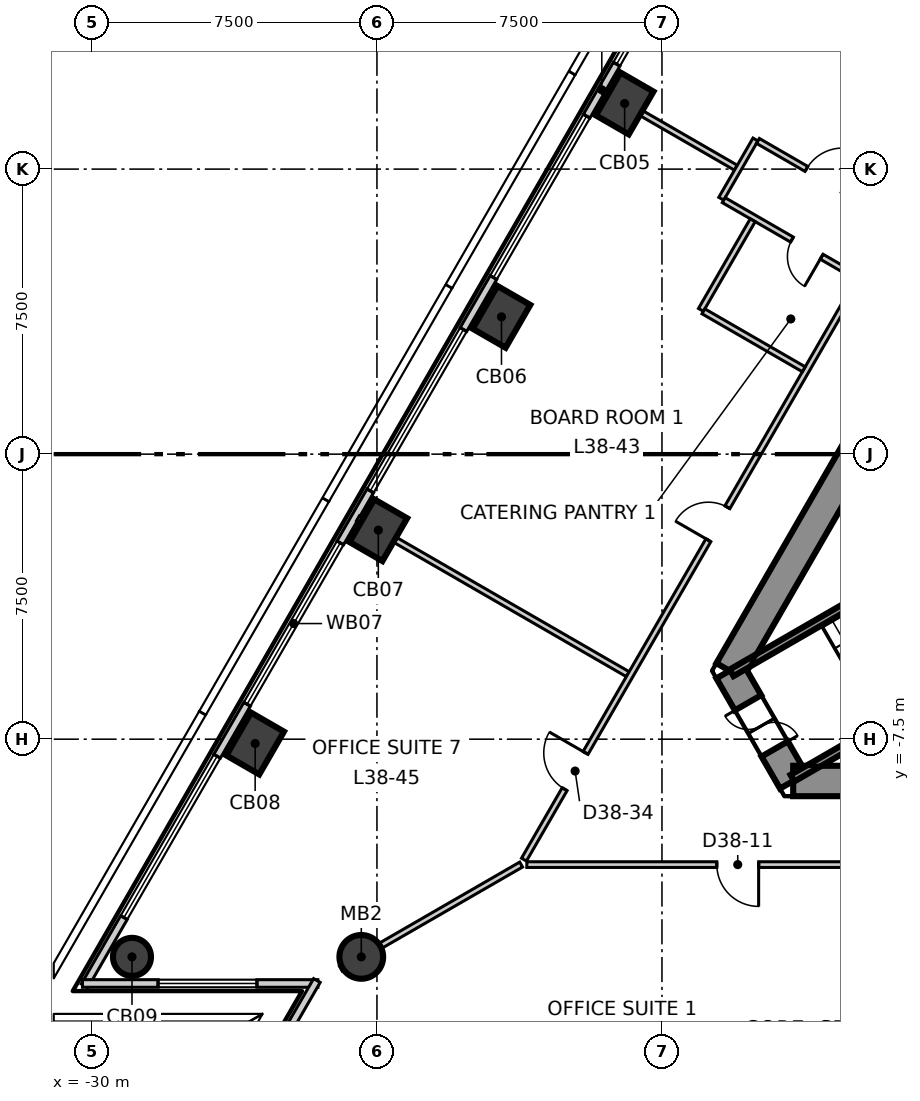
"""IFC4 building model, lengths in metres.
Left out: names, types, materials, properties, quantities, classifications, styles, units other than length and angle.
Written with IfcOpenShell. Run it as: python <this file> out.ifc"""

import sys

from ifc_helpers import new_model, si_unit, direction, frame, frame_2d, origin, origin_2d, place, context, subcontext, project, spatial, polyline, rectangle, circle, outline, extrude, element, fill, save


model = new_model("IFC4")
c1 = context("Model", 3, precision=1e-05, world=origin(), true_north=direction((0.0, 1.0)))
c2 = subcontext(c1, "Body", "Model", "MODEL_VIEW")
j1 = project(units=[si_unit("LENGTHUNIT", "METRE"), si_unit("PLANEANGLEUNIT", "RADIAN")], contexts=[c1])
p1 = place(None, origin())
s1 = spatial("IfcSite", under=j1, at=p1, CompositionType="ELEMENT")
p2 = place(p1, origin())
s2 = spatial("IfcBuilding", under=s1, at=p2, CompositionType="ELEMENT")
p3 = place(p2, frame((0.0, 0.0, 164.3)))
s3 = spatial("IfcBuildingStorey", under=s2, at=p3, CompositionType="ELEMENT", Elevation=164.3)
p4 = place(p3, frame((-1.674, 14.3, -0.3), z_axis=(0.0, 0.0, 1.0), x_axis=(-0.499995765644, -0.866027848477, 0.0)))
e1 = element("IfcWall", 1, at=p4, inside=s3, PredefinedType="SHEAR", context=c2, shape_type="SweptSolid", body=[
    extrude(outline(polyline([(-0.231, -0.4), (1.732, -0.4), (3.695, -0.4), (5.658, -0.4), (7.621, -0.4), (9.584, -0.4), (11.547, -0.4), (13.51, -0.4), (15.473, -0.4), (17.436, -0.4), (19.399, -0.4), (21.362, -0.4), (23.325, -0.4), (22.863, 0.4), (20.977, 0.4), (19.091, 0.4), (17.205, 0.4), (15.319, 0.4), (13.433, 0.4), (11.547, 0.4), (9.661, 0.4), (7.775, 0.4), (5.889, 0.4), (4.003, 0.4), (2.117, 0.4), (0.231, 0.4), (-0.231, -0.4)])), origin(), (0.0, 0.0, 1.0), 4.0),
])
p5 = place(p4, frame((10.997, 0.0, 0.3)))
e2 = element("IfcOpeningElement", 2, at=p5, cuts=e1, PredefinedType="OPENING", context=c2, shape_type="SweptSolid", body=[
    extrude(rectangle(XDim=1.1, YDim=2.1, at=frame_2d((0.55, 1.05))), frame((0.0, 0.41, 0.0), z_axis=(0.0, -1.0, 0.0), x_axis=(1.0, 0.0, 0.0)), (0.0, 0.0, 1.0), 0.82),
])
p6 = place(p3, frame((-13.221, -5.7, -0.3), z_axis=(0.0, 0.0, 1.0), x_axis=(0.49987182685, -0.866099391942, 0.0)))
e3 = element("IfcWall", 3, at=p6, inside=s3, PredefinedType="SHEAR", context=c2, shape_type="SweptSolid", body=[
    extrude(outline(polyline([(-0.231, -0.4), (1.674, -0.4), (3.579, -0.4), (3.118, 0.4), (1.674, 0.4), (0.231, 0.4), (-0.231, -0.4)])), origin(), (0.0, 0.0, 1.0), 4.0),
])
p7 = place(p6, frame((0.974, 0.0, 0.3)))
e4 = element("IfcOpeningElement", 4, at=p7, cuts=e3, PredefinedType="OPENING", context=c2, shape_type="SweptSolid", body=[
    extrude(rectangle(XDim=1.4, YDim=2.1, at=frame_2d((0.7, 1.05))), frame((0.0, 0.41, 0.0), z_axis=(0.0, -1.0, 0.0), x_axis=(1.0, 0.0, 0.0)), (0.0, 0.0, 1.0), 0.82),
])
p8 = place(p3, frame((-11.547, -8.6, -0.3), z_axis=(0.0, 0.0, 1.0), x_axis=(1.0, 0.0, 0.0)))
e5 = element("IfcWall", 5, at=p8, inside=s3, PredefinedType="SHEAR", context=c2, shape_type="SweptSolid", body=[
    extrude(outline(polyline([(-0.231, -0.4), (1.732, -0.4), (3.695, -0.4), (5.658, -0.4), (7.621, -0.4), (9.584, -0.4), (11.547, -0.4), (13.51, -0.4), (15.473, -0.4), (17.436, -0.4), (19.399, -0.4), (21.362, -0.4), (23.325, -0.4), (22.863, 0.4), (20.977, 0.4), (19.091, 0.4), (17.205, 0.4), (15.319, 0.4), (13.433, 0.4), (11.547, 0.4), (9.661, 0.4), (7.775, 0.4), (5.889, 0.4), (4.003, 0.4), (2.117, 0.4), (0.231, 0.4), (-0.231, -0.4)])), origin(), (0.0, 0.0, 1.0), 4.0),
])
p9 = place(p8, frame((3.34, 0.0, 0.3)))
e6 = element("IfcOpeningElement", 6, at=p9, cuts=e5, PredefinedType="OPENING", context=c2, shape_type="SweptSolid", body=[
    extrude(rectangle(XDim=0.9, YDim=2.1, at=frame_2d((0.45, 1.05))), frame((0.0, 0.41, 0.0), z_axis=(0.0, -1.0, 0.0), x_axis=(1.0, 0.0, 0.0)), (0.0, 0.0, 1.0), 0.82),
])
p10 = place(p8, frame((17.722, 0.0, 0.3)))
e7 = element("IfcOpeningElement", 7, at=p10, cuts=e5, PredefinedType="OPENING", context=c2, shape_type="SweptSolid", body=[
    extrude(rectangle(XDim=0.9, YDim=2.1, at=frame_2d((0.45, 1.05))), frame((0.0, 0.41, 0.0), z_axis=(0.0, -1.0, 0.0), x_axis=(1.0, 0.0, 0.0)), (0.0, 0.0, 1.0), 0.82),
])
for number, where, z_axis, x_axis in (
    (8, (-15.982, 9.227, -0.3), (0.0, 0.0, 1.0), (0.5, 0.866, 0.0)),
    (9, (-19.223, 3.613, -0.3), (0.0, 0.0, 1.0), (0.5, 0.866, 0.0)),
    (10, (-22.464, -2.0, -0.3), (0.0, 0.0, 1.0), (0.5, 0.866, 0.0)),
    (11, (-25.705, -7.614, -0.3), (0.0, 0.0, 1.0), (0.5, 0.866, 0.0)),
):
    element("IfcColumn", number, at=place(p3, frame(where, z_axis=z_axis, x_axis=x_axis)), inside=s3, PredefinedType="COLUMN", context=c2, shape_type="SweptSolid", body=[
        extrude(rectangle(XDim=1.3, YDim=1.0, at=origin_2d()), origin(), (0.0, 0.0, 1.0), 4.0),
    ])
p11 = place(p3, frame((-28.946, -13.228, -0.3), z_axis=(0.0, 0.0, 1.0), x_axis=(0.5, 0.866025403784, 0.0)))
e12 = element("IfcColumn", 12, at=p11, inside=s3, PredefinedType="COLUMN", context=c2, shape_type="SweptSolid", body=[
    extrude(circle(Radius=0.5, at=origin_2d()), origin(), (0.0, 0.0, 1.0), 4.0),
])
p12 = place(p3, frame((-22.912, -13.228, -0.3), z_axis=(0.0, 0.0, 1.0), x_axis=(1.0, 0.0, 0.0)))
e13 = element("IfcColumn", 13, at=p12, inside=s3, PredefinedType="COLUMN", context=c2, shape_type="SweptSolid", body=[
    extrude(circle(Radius=0.575, at=origin_2d()), origin(), (0.0, 0.0, 1.0), 4.0),
])
p13 = place(p3, frame((-2.972, 33.16, 0.0), z_axis=(0.0, 0.0, 1.0), x_axis=(-0.500009959561, -0.866019653553, 0.0)))
e14 = element("IfcWall", 14, at=p13, inside=s3, PredefinedType="ELEMENTEDWALL", context=c2, shape_type="SweptSolid", body=[
    extrude(rectangle(XDim=54.443, YDim=0.2, at=frame_2d((27.222, 0.0))), origin(), (0.0, 0.0, 1.0), 3.7),
])
p14 = place(p13, frame((2.094, 0.0, 0.9)))
e15 = element("IfcOpeningElement", 15, at=p14, cuts=e14, PredefinedType="OPENING", context=c2, shape_type="SweptSolid", body=[
    extrude(rectangle(XDim=4.9, YDim=2.5, at=frame_2d((2.45, 1.25))), frame((0.0, 0.11, 0.0), z_axis=(0.0, -1.0, 0.0), x_axis=(1.0, 0.0, 0.0)), (0.0, 0.0, 1.0), 0.22),
])
p15 = place(p13, frame((8.576, 0.0, 0.9)))
e16 = element("IfcOpeningElement", 16, at=p15, cuts=e14, PredefinedType="OPENING", context=c2, shape_type="SweptSolid", body=[
    extrude(rectangle(XDim=4.9, YDim=2.5, at=frame_2d((2.45, 1.25))), frame((0.0, 0.11, 0.0), z_axis=(0.0, -1.0, 0.0), x_axis=(1.0, 0.0, 0.0)), (0.0, 0.0, 1.0), 0.22),
])
p16 = place(p13, frame((15.058, 0.0, 0.9)))
e17 = element("IfcOpeningElement", 17, at=p16, cuts=e14, PredefinedType="OPENING", context=c2, shape_type="SweptSolid", body=[
    extrude(rectangle(XDim=4.9, YDim=2.5, at=frame_2d((2.45, 1.25))), frame((0.0, 0.11, 0.0), z_axis=(0.0, -1.0, 0.0), x_axis=(1.0, 0.0, 0.0)), (0.0, 0.0, 1.0), 0.22),
])
p17 = place(p13, frame((21.54, 0.0, 0.9)))
e18 = element("IfcOpeningElement", 18, at=p17, cuts=e14, PredefinedType="OPENING", context=c2, shape_type="SweptSolid", body=[
    extrude(rectangle(XDim=4.9, YDim=2.5, at=frame_2d((2.45, 1.25))), frame((0.0, 0.11, 0.0), z_axis=(0.0, -1.0, 0.0), x_axis=(1.0, 0.0, 0.0)), (0.0, 0.0, 1.0), 0.22),
])
p18 = place(p13, frame((28.022, 0.0, 0.9)))
e19 = element("IfcOpeningElement", 19, at=p18, cuts=e14, PredefinedType="OPENING", context=c2, shape_type="SweptSolid", body=[
    extrude(rectangle(XDim=4.9, YDim=2.5, at=frame_2d((2.45, 1.25))), frame((0.0, 0.11, 0.0), z_axis=(0.0, -1.0, 0.0), x_axis=(1.0, 0.0, 0.0)), (0.0, 0.0, 1.0), 0.22),
])
p19 = place(p13, frame((34.505, 0.0, 0.9)))
e20 = element("IfcOpeningElement", 20, at=p19, cuts=e14, PredefinedType="OPENING", context=c2, shape_type="SweptSolid", body=[
    extrude(rectangle(XDim=4.9, YDim=2.5, at=frame_2d((2.45, 1.25))), frame((0.0, 0.11, 0.0), z_axis=(0.0, -1.0, 0.0), x_axis=(1.0, 0.0, 0.0)), (0.0, 0.0, 1.0), 0.22),
])
p20 = place(p13, frame((40.987, 0.0, 0.9)))
e21 = element("IfcOpeningElement", 21, at=p20, cuts=e14, PredefinedType="OPENING", context=c2, shape_type="SweptSolid", body=[
    extrude(rectangle(XDim=4.9, YDim=2.5, at=frame_2d((2.45, 1.25))), frame((0.0, 0.11, 0.0), z_axis=(0.0, -1.0, 0.0), x_axis=(1.0, 0.0, 0.0)), (0.0, 0.0, 1.0), 0.22),
])
p21 = place(p13, frame((47.469, 0.0, 0.9)))
e22 = element("IfcOpeningElement", 22, at=p21, cuts=e14, PredefinedType="OPENING", context=c2, shape_type="SweptSolid", body=[
    extrude(rectangle(XDim=4.9, YDim=2.5, at=frame_2d((2.45, 1.25))), frame((0.0, 0.11, 0.0), z_axis=(0.0, -1.0, 0.0), x_axis=(1.0, 0.0, 0.0)), (0.0, 0.0, 1.0), 0.22),
])
p22 = place(p3, frame((-30.249, -13.928, 0.0), z_axis=(0.0, 0.0, 1.0), x_axis=(1.0, 0.0, 0.0)))
e23 = element("IfcWall", 23, at=p22, inside=s3, PredefinedType="ELEMENTEDWALL", context=c2, shape_type="SweptSolid", body=[
    extrude(rectangle(XDim=6.194, YDim=0.2, at=frame_2d((3.097, 0.0))), origin(), (0.0, 0.0, 1.0), 3.7),
])
p23 = place(p22, frame((1.99, 0.0, 0.9)))
e24 = element("IfcOpeningElement", 24, at=p23, cuts=e23, PredefinedType="OPENING", context=c2, shape_type="SweptSolid", body=[
    extrude(rectangle(XDim=2.6, YDim=2.5, at=frame_2d((1.3, 1.25))), frame((0.0, 0.11, 0.0), z_axis=(0.0, -1.0, 0.0), x_axis=(1.0, 0.0, 0.0)), (0.0, 0.0, 1.0), 0.22),
])
p24 = place(p3, frame((-24.08, -13.85, 0.0), z_axis=(0.0, 0.0, 1.0), x_axis=(-0.499932836684, -0.86606417707, 0.0)))
e25 = element("IfcWall", 25, at=p24, inside=s3, PredefinedType="ELEMENTEDWALL", context=c2, shape_type="SweptSolid", body=[
    extrude(rectangle(XDim=6.195, YDim=0.2, at=frame_2d((3.097, 0.0))), origin(), (0.0, 0.0, 1.0), 3.7),
])
p25 = place(p24, frame((1.39, 0.0, 0.9)))
e26 = element("IfcOpeningElement", 26, at=p25, cuts=e25, PredefinedType="OPENING", context=c2, shape_type="SweptSolid", body=[
    extrude(rectangle(XDim=2.6, YDim=2.5, at=frame_2d((1.3, 1.25))), frame((0.0, 0.11, 0.0), z_axis=(0.0, -1.0, 0.0), x_axis=(1.0, 0.0, 0.0)), (0.0, 0.0, 1.0), 0.22),
])
p26 = place(p3, frame((-23.449, -13.538, 0.0), z_axis=(0.0, 0.0, 1.0), x_axis=(0.865971038555, 0.500094151519, 0.0)))
e27 = element("IfcWall", 27, at=p26, inside=s3, PredefinedType="PARTITIONING", context=c2, shape_type="SweptSolid", body=[
    extrude(rectangle(XDim=5.477, YDim=0.15, at=frame_2d((2.739, 0.0))), origin(), (0.0, 0.0, 1.0), 3.2),
])
p27 = place(p3, frame((-23.001, -1.69, 0.0), z_axis=(0.0, 0.0, 1.0), x_axis=(0.866010060309, -0.500026574738, 0.0)))
e28 = element("IfcWall", 28, at=p27, inside=s3, PredefinedType="PARTITIONING", context=c2, shape_type="SweptSolid", body=[
    extrude(rectangle(XDim=8.2, YDim=0.15, at=frame_2d((4.1, 0.0))), origin(), (0.0, 0.0, 1.0), 3.7),
])
p28 = place(p3, frame((-18.556, -10.8, 0.0), z_axis=(0.0, 0.0, 1.0), x_axis=(1.0, 0.0, 0.0)))
e29 = element("IfcWall", 29, at=p28, inside=s3, PredefinedType="PARTITIONING", context=c2, shape_type="SweptSolid", body=[
    extrude(rectangle(XDim=11.098, YDim=0.15, at=frame_2d((5.549, 0.0))), origin(), (0.0, 0.0, 1.0), 3.7),
])
p29 = place(p28, frame((5.0, 0.0, 0.0)))
e30 = element("IfcOpeningElement", 30, at=p29, cuts=e29, PredefinedType="OPENING", context=c2, shape_type="SweptSolid", body=[
    extrude(rectangle(XDim=1.1, YDim=2.1, at=frame_2d((0.55, 1.05))), frame((0.0, 0.085, 0.0), z_axis=(0.0, -1.0, 0.0), x_axis=(1.0, 0.0, 0.0)), (0.0, 0.0, 1.0), 0.17),
])
p30 = place(p3, frame((-18.631, -10.669, 0.0), z_axis=(0.0, 0.0, 1.0), x_axis=(0.500000173646, 0.86602530353, 0.0)))
e31 = element("IfcWall", 31, at=p30, inside=s3, PredefinedType="PARTITIONING", context=c2, shape_type="SweptSolid", body=[
    extrude(rectangle(XDim=17.654, YDim=0.15, at=frame_2d((8.827, 0.0))), origin(), (0.0, 0.0, 1.0), 3.7),
])
p31 = place(p30, frame((9.705, 0.0, 0.0)))
e32 = element("IfcOpeningElement", 32, at=p31, cuts=e31, PredefinedType="OPENING", context=c2, shape_type="SweptSolid", body=[
    extrude(rectangle(XDim=1.0, YDim=2.1, at=frame_2d((0.5, 1.05))), frame((0.0, 0.085, 0.0), z_axis=(0.0, -1.0, 0.0), x_axis=(1.0, 0.0, 0.0)), (0.0, 0.0, 1.0), 0.17),
])
p32 = place(p30, frame((2.141, 0.0, 0.0)))
e33 = element("IfcOpeningElement", 33, at=p32, cuts=e31, PredefinedType="OPENING", context=c2, shape_type="SweptSolid", body=[
    extrude(rectangle(XDim=1.1, YDim=2.1, at=frame_2d((0.55, 1.05))), frame((0.0, 0.085, 0.0), z_axis=(0.0, -1.0, 0.0), x_axis=(1.0, 0.0, 0.0)), (0.0, 0.0, 1.0), 0.17),
])
p33 = place(p3, frame((-16.519, 9.537, 0.0), z_axis=(0.0, 0.0, 1.0), x_axis=(0.866026010844, -0.49999894854, 0.0)))
e34 = element("IfcWall", 34, at=p33, inside=s3, PredefinedType="PARTITIONING", context=c2, shape_type="SweptSolid", body=[
    extrude(rectangle(XDim=4.0, YDim=0.15, at=frame_2d((2.0, 0.0))), origin(), (0.0, 0.0, 1.0), 3.2),
])
p34 = place(p3, frame((-13.44, 6.72, 0.0), z_axis=(0.0, 0.0, 1.0), x_axis=(0.499902469156, 0.866081705922, 0.0)))
e35 = element("IfcWall", 35, at=p34, inside=s3, PredefinedType="PARTITIONING", context=c2, shape_type="SweptSolid", body=[
    extrude(rectangle(XDim=1.8, YDim=0.15, at=frame_2d((0.9, 0.0))), origin(), (0.0, 0.0, 1.0), 3.7),
])
p35 = place(p3, frame((-12.475, 8.242, 0.0), z_axis=(0.0, 0.0, 1.0), x_axis=(0.865955608197, -0.500120870022, 0.0)))
e36 = element("IfcWall", 36, at=p35, inside=s3, PredefinedType="PARTITIONING", context=c2, shape_type="SweptSolid", body=[
    extrude(rectangle(XDim=4.049, YDim=0.15, at=frame_2d((2.024, 0.0))), origin(), (0.0, 0.0, 1.0), 3.7),
])
p36 = place(p35, frame((1.475, 0.0, 0.0)))
e37 = element("IfcOpeningElement", 37, at=p36, cuts=e36, PredefinedType="OPENING", context=c2, shape_type="SweptSolid", body=[
    extrude(rectangle(XDim=1.1, YDim=2.1, at=frame_2d((0.55, 1.05))), frame((0.0, 0.085, 0.0), z_axis=(0.0, -1.0, 0.0), x_axis=(1.0, 0.0, 0.0)), (0.0, 0.0, 1.0), 0.17),
])
p37 = place(p3, frame((-13.375, 6.683, 0.0), z_axis=(0.0, 0.0, 1.0), x_axis=(0.865929493314, -0.500166085025, 0.0)))
e38 = element("IfcWall", 38, at=p37, inside=s3, PredefinedType="PARTITIONING", context=c2, shape_type="SweptSolid", body=[
    extrude(rectangle(XDim=4.049, YDim=0.15, at=frame_2d((2.024, 0.0))), origin(), (0.0, 0.0, 1.0), 3.7),
])
p38 = place(p37, frame((2.075, 0.0, 0.0)))
e39 = element("IfcOpeningElement", 39, at=p38, cuts=e38, PredefinedType="OPENING", context=c2, shape_type="SweptSolid", body=[
    extrude(rectangle(XDim=0.9, YDim=2.1, at=frame_2d((0.45, 1.05))), frame((0.0, 0.085, 0.0), z_axis=(0.0, -1.0, 0.0), x_axis=(1.0, 0.0, 0.0)), (0.0, 0.0, 1.0), 0.17),
])
p39 = place(p3, frame((-13.974, 3.796, 0.0), z_axis=(0.0, 0.0, 1.0), x_axis=(0.500004325324, 0.866022906543, 0.0)))
e40 = element("IfcWall", 40, at=p39, inside=s3, PredefinedType="PARTITIONING", context=c2, shape_type="SweptSolid", body=[
    extrude(rectangle(XDim=2.724, YDim=0.15, at=frame_2d((1.362, 0.0))), origin(), (0.0, 0.0, 1.0), 3.7),
])
p40 = place(p3, frame((-13.909, 3.758, 0.0), z_axis=(0.0, 0.0, 1.0), x_axis=(0.865962925632, -0.500108199725, 0.0)))
e41 = element("IfcWall", 41, at=p40, inside=s3, PredefinedType="PARTITIONING", context=c2, shape_type="SweptSolid", body=[
    extrude(rectangle(XDim=3.05, YDim=0.15, at=frame_2d((1.525, 0.0))), origin(), (0.0, 0.0, 1.0), 3.7),
])
p41 = place(p3, frame((-10.324, 10.769, 0.0), z_axis=(0.0, 0.0, 1.0), x_axis=(0.866031223622, -0.49998991961, 0.0)))
e42 = element("IfcWall", 42, at=p41, inside=s3, PredefinedType="PARTITIONING", context=c2, shape_type="SweptSolid", body=[
    extrude(rectangle(XDim=3.45, YDim=0.15, at=frame_2d((1.725, 0.0))), origin(), (0.0, 0.0, 1.0), 3.7),
])
p42 = place(p3, frame((-13.167, -5.754, 0.0), z_axis=(0.0, 0.0, 1.0), x_axis=(0.866060938598, 0.499938446846, 0.0)))
e43 = element("IfcWall", 43, at=p42, inside=s3, PredefinedType="SOLIDWALL", context=c2, shape_type="SweptSolid", body=[
    extrude(rectangle(XDim=7.665, YDim=0.2, at=frame_2d((3.832, 0.0))), origin(), (0.0, 0.0, 1.0), 3.7),
])
p43 = place(p3, frame((-11.567, -8.526, 0.0), z_axis=(0.0, 0.0, 1.0), x_axis=(0.866005769735, 0.50003400563, 0.0)))
e44 = element("IfcWall", 44, at=p43, inside=s3, PredefinedType="SOLIDWALL", context=c2, shape_type="SweptSolid", body=[
    extrude(rectangle(XDim=7.665, YDim=0.2, at=frame_2d((3.833, 0.0))), origin(), (0.0, 0.0, 1.0), 3.7),
])
p44 = place(p17, origin())
e45 = element("IfcWindow", 45, at=p44, inside=s3, PartitioningType="SINGLE_PANEL", PredefinedType="WINDOW", context=c2, shape_type="SweptSolid", body=[
    extrude(rectangle(XDim=4.9, YDim=2.5, at=frame_2d((2.45, 1.25))), frame((0.0, 0.03, 0.0), z_axis=(0.0, -1.0, 0.0), x_axis=(1.0, 0.0, 0.0)), (0.0, 0.0, 1.0), 0.06),
])
fill(e18, e45)
p45 = place(p18, origin())
e46 = element("IfcWindow", 46, at=p45, inside=s3, PartitioningType="SINGLE_PANEL", PredefinedType="WINDOW", context=c2, shape_type="SweptSolid", body=[
    extrude(rectangle(XDim=4.9, YDim=2.5, at=frame_2d((2.45, 1.25))), frame((0.0, 0.03, 0.0), z_axis=(0.0, -1.0, 0.0), x_axis=(1.0, 0.0, 0.0)), (0.0, 0.0, 1.0), 0.06),
])
fill(e19, e46)
p46 = place(p19, origin())
e47 = element("IfcWindow", 47, at=p46, inside=s3, PartitioningType="SINGLE_PANEL", PredefinedType="WINDOW", context=c2, shape_type="SweptSolid", body=[
    extrude(rectangle(XDim=4.9, YDim=2.5, at=frame_2d((2.45, 1.25))), frame((0.0, 0.03, 0.0), z_axis=(0.0, -1.0, 0.0), x_axis=(1.0, 0.0, 0.0)), (0.0, 0.0, 1.0), 0.06),
])
fill(e20, e47)
p47 = place(p20, origin())
e48 = element("IfcWindow", 48, at=p47, inside=s3, PartitioningType="SINGLE_PANEL", PredefinedType="WINDOW", context=c2, shape_type="SweptSolid", body=[
    extrude(rectangle(XDim=4.9, YDim=2.5, at=frame_2d((2.45, 1.25))), frame((0.0, 0.03, 0.0), z_axis=(0.0, -1.0, 0.0), x_axis=(1.0, 0.0, 0.0)), (0.0, 0.0, 1.0), 0.06),
])
fill(e21, e48)
p48 = place(p21, origin())
e49 = element("IfcWindow", 49, at=p48, inside=s3, PartitioningType="SINGLE_PANEL", PredefinedType="WINDOW", context=c2, shape_type="SweptSolid", body=[
    extrude(rectangle(XDim=4.9, YDim=2.5, at=frame_2d((2.45, 1.25))), frame((0.0, 0.03, 0.0), z_axis=(0.0, -1.0, 0.0), x_axis=(1.0, 0.0, 0.0)), (0.0, 0.0, 1.0), 0.06),
])
fill(e22, e49)
p49 = place(p23, origin())
e50 = element("IfcWindow", 50, at=p49, inside=s3, PartitioningType="SINGLE_PANEL", PredefinedType="WINDOW", context=c2, shape_type="SweptSolid", body=[
    extrude(rectangle(XDim=2.6, YDim=2.5, at=frame_2d((1.3, 1.25))), frame((0.0, 0.03, 0.0), z_axis=(0.0, -1.0, 0.0), x_axis=(1.0, 0.0, 0.0)), (0.0, 0.0, 1.0), 0.06),
])
fill(e24, e50)
p50 = place(p29, origin())
e51 = element("IfcDoor", 51, at=p50, inside=s3, OperationType="SINGLE_SWING_RIGHT", PredefinedType="DOOR", context=c2, shape_type="SweptSolid", body=[
    extrude(rectangle(XDim=1.1, YDim=2.1, at=frame_2d((0.55, 1.05))), frame((0.0, 0.025, 0.0), z_axis=(0.0, -1.0, 0.0), x_axis=(1.0, 0.0, 0.0)), (0.0, 0.0, 1.0), 0.05),
])
fill(e30, e51)
p51 = place(p36, origin())
e52 = element("IfcDoor", 52, at=p51, inside=s3, OperationType="SINGLE_SWING_LEFT", PredefinedType="DOOR", context=c2, shape_type="SweptSolid", body=[
    extrude(rectangle(XDim=1.1, YDim=2.1, at=frame_2d((0.55, 1.05))), frame((0.0, 0.025, 0.0), z_axis=(0.0, -1.0, 0.0), x_axis=(1.0, 0.0, 0.0)), (0.0, 0.0, 1.0), 0.05),
])
fill(e37, e52)
p52 = place(p31, origin())
e53 = element("IfcDoor", 53, at=p52, inside=s3, OperationType="SINGLE_SWING_RIGHT", PredefinedType="DOOR", context=c2, shape_type="SweptSolid", body=[
    extrude(rectangle(XDim=1.0, YDim=2.1, at=frame_2d((0.5, 1.05))), frame((0.0, 0.025, 0.0), z_axis=(0.0, -1.0, 0.0), x_axis=(1.0, 0.0, 0.0)), (0.0, 0.0, 1.0), 0.05),
])
fill(e32, e53)
p53 = place(p38, origin())
e54 = element("IfcDoor", 54, at=p53, inside=s3, OperationType="SINGLE_SWING_RIGHT", PredefinedType="DOOR", context=c2, shape_type="SweptSolid", body=[
    extrude(rectangle(XDim=0.9, YDim=2.1, at=frame_2d((0.45, 1.05))), frame((0.0, 0.025, 0.0), z_axis=(0.0, -1.0, 0.0), x_axis=(1.0, 0.0, 0.0)), (0.0, 0.0, 1.0), 0.05),
])
fill(e39, e54)
p54 = place(p32, origin())
e55 = element("IfcDoor", 55, at=p54, inside=s3, OperationType="SINGLE_SWING_LEFT", PredefinedType="DOOR", context=c2, shape_type="SweptSolid", body=[
    extrude(rectangle(XDim=1.1, YDim=2.1, at=frame_2d((0.55, 1.05))), frame((0.0, 0.025, 0.0), z_axis=(0.0, -1.0, 0.0), x_axis=(1.0, 0.0, 0.0)), (0.0, 0.0, 1.0), 0.05),
])
fill(e33, e55)
p55 = place(p7, origin())
e56 = element("IfcDoor", 56, at=p55, inside=s3, OperationType="DOUBLE_DOOR_SINGLE_SWING", PredefinedType="DOOR", context=c2, shape_type="SweptSolid", body=[
    extrude(rectangle(XDim=1.4, YDim=2.1, at=frame_2d((0.7, 1.05))), frame((0.0, 0.025, 0.0), z_axis=(0.0, -1.0, 0.0), x_axis=(1.0, 0.0, 0.0)), (0.0, 0.0, 1.0), 0.05),
])
fill(e4, e56)
save(model, sys.argv[1])
